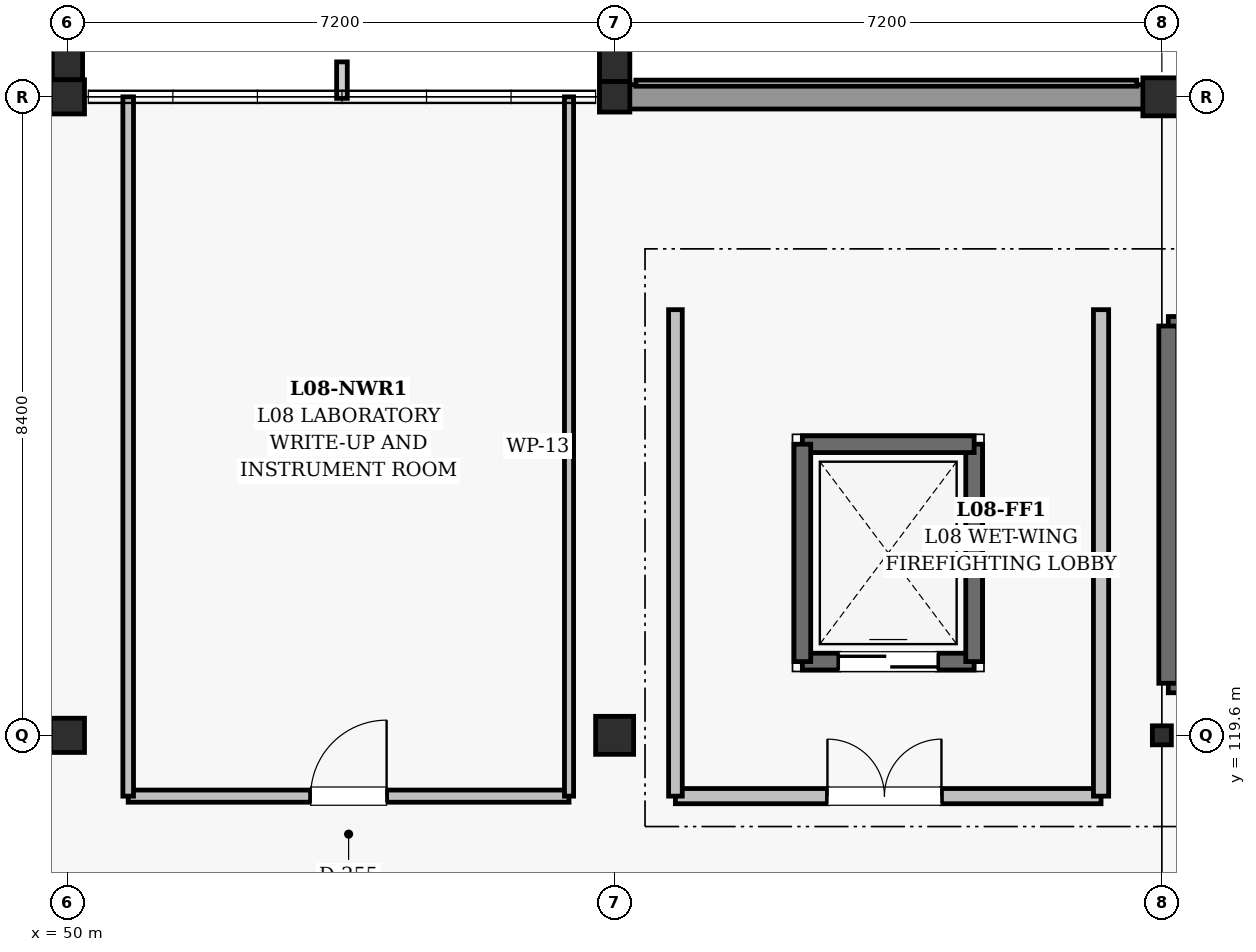
"""IFC4 building model, lengths in metres.
Left out: names, types, materials, properties, quantities, classifications, styles, units other than length and angle.
Written with IfcOpenShell. Run it as: python <this file> out.ifc"""

import sys

from ifc_helpers import new_model, si_unit, direction, frame, frame_2d, origin, origin_2d, place, context, subcontext, project, spatial, rectangle, i_section, extrude, element, fill, save


model = new_model("IFC4")
c1 = context("Model", 3, precision=1e-05, world=origin(), true_north=direction((0.0, 1.0)))
c2 = subcontext(c1, "Body", "Model", "MODEL_VIEW")
j1 = project(units=[si_unit("LENGTHUNIT", "METRE"), si_unit("PLANEANGLEUNIT", "RADIAN")], contexts=[c1])
p1 = place(None, origin())
s1 = spatial("IfcSite", under=j1, at=p1, CompositionType="ELEMENT")
p2 = place(p1, origin())
s2 = spatial("IfcBuilding", under=s1, at=p2, CompositionType="ELEMENT")
p3 = place(p2, frame((0.0, 0.0, 36.9)))
s3 = spatial("IfcBuildingStorey", under=s2, at=p3, CompositionType="ELEMENT", Elevation=36.9)
for number, where, z_axis, x_axis in (
    (1, (50.0, 119.6, 0.0), (0.0, 0.0, 1.0), (1.0, 0.0, 0.0)),
    (2, (50.0, 128.0, 0.0), (0.0, 0.0, 1.0), (1.0, 0.0, 0.0)),
):
    element("IfcColumn", number, at=place(p3, frame(where, z_axis=z_axis, x_axis=x_axis)), inside=s3, PredefinedType="COLUMN", context=c2, shape_type="SweptSolid", body=[
        extrude(rectangle(XDim=0.45, YDim=0.45, at=origin_2d()), origin(), (0.0, 0.0, 1.0), 4.5),
    ])
p4 = place(p3, frame((57.2, 119.6, 0.0), z_axis=(0.0, 0.0, 1.0), x_axis=(1.0, 0.0, 0.0)))
e3 = element("IfcColumn", 3, at=p4, inside=s3, PredefinedType="COLUMN", context=c2, shape_type="SweptSolid", body=[
    extrude(rectangle(XDim=0.5, YDim=0.5, at=origin_2d()), origin(), (0.0, 0.0, 1.0), 4.5),
])
p5 = place(p3, frame((57.2, 128.0, 0.0), z_axis=(0.0, 0.0, 1.0), x_axis=(1.0, 0.0, 0.0)))
e4 = element("IfcColumn", 4, at=p5, inside=s3, PredefinedType="COLUMN", context=c2, shape_type="SweptSolid", body=[
    extrude(rectangle(XDim=0.4, YDim=0.4, at=origin_2d()), origin(), (0.0, 0.0, 1.0), 4.5),
])
p6 = place(p3, frame((64.4, 119.6, 0.0), z_axis=(0.0, 0.0, 1.0), x_axis=(1.0, 0.0, 0.0)))
e5 = element("IfcColumn", 5, at=p6, inside=s3, PredefinedType="COLUMN", context=c2, shape_type="SweptSolid", body=[
    extrude(i_section(OverallWidth=0.25, OverallDepth=0.25, WebThickness=0.009, FlangeThickness=0.01, FilletRadius=0.01, at=origin_2d()), origin(), (0.0, 0.0, 1.0), 4.5),
])
p7 = place(p3, frame((64.4, 128.0, 0.0), z_axis=(0.0, 0.0, 1.0), x_axis=(1.0, 0.0, 0.0)))
e6 = element("IfcColumn", 6, at=p7, inside=s3, PredefinedType="COLUMN", context=c2, shape_type="SweptSolid", body=[
    extrude(rectangle(XDim=0.5, YDim=0.5, at=origin_2d()), origin(), (0.0, 0.0, 1.0), 4.5),
])
for number, where, z_axis, x_axis in (
    (7, (50.0, 128.528, 0.0), (0.0, 0.0, 1.0), (1.0, 0.0, 0.0)),
    (8, (57.2, 128.503, 0.0), (0.0, 0.0, 1.0), (1.0, 0.0, 0.0)),
):
    element("IfcColumn", number, at=place(p3, frame(where, z_axis=z_axis, x_axis=x_axis)), inside=s3, PredefinedType="PILASTER", context=c2, shape_type="SweptSolid", body=[
        extrude(rectangle(XDim=0.4, YDim=0.6, at=origin_2d()), origin(), (0.0, 0.0, 1.0), 4.5),
    ])
p8 = place(p3, frame((57.38, 128.0, 0.0), z_axis=(0.0, 0.0, 1.0), x_axis=(1.0, 0.0, 0.0)))
e9 = element("IfcWall", 9, at=p8, inside=s3, PredefinedType="SOLIDWALL", context=c2, shape_type="SweptSolid", body=[
    extrude(rectangle(XDim=6.79, YDim=0.32, at=frame_2d((3.395, 0.0))), origin(), (0.0, 0.0, 1.0), 3.305),
])
p9 = place(p3, frame((64.485, 120.285, 0.0), z_axis=(0.0, 0.0, 1.0), x_axis=(1.0, 0.0, 0.0)))
e10 = element("IfcWall", 10, at=p9, inside=s3, PredefinedType="SHEAR", context=c2, shape_type="SweptSolid", body=[
    extrude(rectangle(XDim=10.63, YDim=0.25, at=frame_2d((5.315, 0.0))), origin(), (0.0, 0.0, 1.0), 4.215),
])
p10 = place(p9, frame((0.55, 0.0, 0.0)))
e11 = element("IfcOpeningElement", 11, at=p10, cuts=e10, PredefinedType="OPENING", context=c2, shape_type="SweptSolid", body=[
    extrude(rectangle(XDim=1.2, YDim=2.15, at=frame_2d((0.6, 1.075))), frame((0.0, 0.135, 0.0), z_axis=(0.0, -1.0, 0.0), x_axis=(1.0, 0.0, 0.0)), (0.0, 0.0, 1.0), 0.27),
])
p11 = place(p3, frame((75.115, 124.985, 0.0), z_axis=(0.0, 0.0, 1.0), x_axis=(-1.0, 0.0, 0.0)))
e12 = element("IfcWall", 12, at=p11, inside=s3, PredefinedType="SHEAR", context=c2, shape_type="SweptSolid", body=[
    extrude(rectangle(XDim=10.63, YDim=0.25, at=frame_2d((5.315, 0.0))), origin(), (0.0, 0.0, 1.0), 4.215),
])
p12 = place(p3, frame((64.485, 124.985, 0.0), z_axis=(0.0, 0.0, 1.0), x_axis=(0.0, -1.0, 0.0)))
e13 = element("IfcWall", 13, at=p12, inside=s3, PredefinedType="SHEAR", context=c2, shape_type="SweptSolid", body=[
    extrude(rectangle(XDim=4.7, YDim=0.25, at=frame_2d((2.35, 0.0))), origin(), (0.0, 0.0, 1.0), 4.215),
])
p13 = place(p3, frame((59.67, 120.57, 0.0), z_axis=(0.0, 0.0, 1.0), x_axis=(1.0, 0.0, 0.0)))
e14 = element("IfcWall", 14, at=p13, inside=s3, PredefinedType="SHEAR", context=c2, shape_type="SweptSolid", body=[
    extrude(rectangle(XDim=2.26, YDim=0.22, at=frame_2d((1.13, 0.0))), origin(), (0.0, 0.0, 1.0), 4.215),
])
p14 = place(p13, frame((0.48, 0.0, 0.0)))
e15 = element("IfcOpeningElement", 15, at=p14, cuts=e14, PredefinedType="OPENING", context=c2, shape_type="SweptSolid", body=[
    extrude(rectangle(XDim=1.3, YDim=2.2, at=frame_2d((0.65, 1.1))), frame((0.0, 0.12, 0.0), z_axis=(0.0, -1.0, 0.0), x_axis=(1.0, 0.0, 0.0)), (0.0, 0.0, 1.0), 0.24),
])
p15 = place(p3, frame((61.93, 120.57, 0.0), z_axis=(0.0, 0.0, 1.0), x_axis=(0.0, 1.0, 0.0)))
e16 = element("IfcWall", 16, at=p15, inside=s3, PredefinedType="SHEAR", context=c2, shape_type="SweptSolid", body=[
    extrude(rectangle(XDim=2.86, YDim=0.22, at=frame_2d((1.43, 0.0))), origin(), (0.0, 0.0, 1.0), 4.215),
])
p16 = place(p3, frame((61.93, 123.43, 0.0), z_axis=(0.0, 0.0, 1.0), x_axis=(-1.0, 0.0, 0.0)))
e17 = element("IfcWall", 17, at=p16, inside=s3, PredefinedType="SHEAR", context=c2, shape_type="SweptSolid", body=[
    extrude(rectangle(XDim=2.26, YDim=0.22, at=frame_2d((1.13, 0.0))), origin(), (0.0, 0.0, 1.0), 4.215),
])
p17 = place(p3, frame((59.67, 123.43, 0.0), z_axis=(0.0, 0.0, 1.0), x_axis=(0.0, -1.0, 0.0)))
e18 = element("IfcWall", 18, at=p17, inside=s3, PredefinedType="SHEAR", context=c2, shape_type="SweptSolid", body=[
    extrude(rectangle(XDim=2.86, YDim=0.22, at=frame_2d((1.43, 0.0))), origin(), (0.0, 0.0, 1.0), 4.215),
])
p18 = place(p3, frame((58.0, 118.8, 0.0), z_axis=(0.0, 0.0, 1.0), x_axis=(1.0, 0.0, 0.0)))
e19 = element("IfcWall", 19, at=p18, inside=s3, PredefinedType="SOLIDWALL", context=c2, shape_type="SweptSolid", body=[
    extrude(rectangle(XDim=5.6, YDim=0.2, at=frame_2d((2.8, 0.0))), origin(), (0.0, 0.0, 1.0), 4.12),
])
p19 = place(p18, frame((2.0, 0.0, 0.0)))
e20 = element("IfcOpeningElement", 20, at=p19, cuts=e19, PredefinedType="OPENING", context=c2, shape_type="SweptSolid", body=[
    extrude(rectangle(XDim=1.5, YDim=2.2, at=frame_2d((0.75, 1.1))), frame((0.0, 0.11, 0.0), z_axis=(0.0, -1.0, 0.0), x_axis=(1.0, 0.0, 0.0)), (0.0, 0.0, 1.0), 0.22),
])
p20 = place(p3, frame((58.0, 118.8, 0.0), z_axis=(0.0, 0.0, 1.0), x_axis=(0.0, 1.0, 0.0)))
e21 = element("IfcWall", 21, at=p20, inside=s3, PredefinedType="SOLIDWALL", context=c2, shape_type="SweptSolid", body=[
    extrude(rectangle(XDim=6.4, YDim=0.18, at=frame_2d((3.2, 0.0))), origin(), (0.0, 0.0, 1.0), 3.36),
])
p21 = place(p3, frame((63.6, 118.8, 0.0), z_axis=(0.0, 0.0, 1.0), x_axis=(0.0, 1.0, 0.0)))
e22 = element("IfcWall", 22, at=p21, inside=s3, PredefinedType="SOLIDWALL", context=c2, shape_type="SweptSolid", body=[
    extrude(rectangle(XDim=6.4, YDim=0.2, at=frame_2d((3.2, 0.0))), origin(), (0.0, 0.0, 1.0), 3.36),
])
p22 = place(p3, frame((50.8, 118.8, 0.0), z_axis=(0.0, 0.0, 1.0), x_axis=(1.0, 0.0, 0.0)))
e23 = element("IfcWall", 23, at=p22, inside=s3, PredefinedType="PARTITIONING", context=c2, shape_type="SweptSolid", body=[
    extrude(rectangle(XDim=5.8, YDim=0.16, at=frame_2d((2.9, 0.0))), origin(), (0.0, 0.0, 1.0), 4.12),
])
p23 = place(p22, frame((2.4, 0.0, 0.0)))
e24 = element("IfcOpeningElement", 24, at=p23, cuts=e23, PredefinedType="OPENING", context=c2, shape_type="SweptSolid", body=[
    extrude(rectangle(XDim=1.0, YDim=2.15, at=frame_2d((0.5, 1.075))), frame((0.0, 0.09, 0.0), z_axis=(0.0, -1.0, 0.0), x_axis=(1.0, 0.0, 0.0)), (0.0, 0.0, 1.0), 0.18),
])
p24 = place(p3, frame((50.8, 118.8, 0.0), z_axis=(0.0, 0.0, 1.0), x_axis=(0.0, 1.0, 0.0)))
e25 = element("IfcWall", 25, at=p24, inside=s3, PredefinedType="PARTITIONING", context=c2, shape_type="SweptSolid", body=[
    extrude(rectangle(XDim=9.2, YDim=0.14, at=frame_2d((4.6, 0.0))), origin(), (0.0, 0.0, 1.0), 3.41),
])
p25 = place(p3, frame((56.6, 118.8, 0.0), z_axis=(0.0, 0.0, 1.0), x_axis=(0.0, 1.0, 0.0)))
e26 = element("IfcWall", 26, at=p25, inside=s3, PredefinedType="PARTITIONING", context=c2, shape_type="SweptSolid", body=[
    extrude(rectangle(XDim=9.2, YDim=0.12, at=frame_2d((4.6, 0.0))), origin(), (0.0, 0.0, 1.0), 3.41),
])
p26 = place(p14, origin())
e27 = element("IfcDoor", 27, at=p26, inside=s3, OperationType="DOUBLE_DOOR_SLIDING", PredefinedType="DOOR", context=c2, shape_type="SweptSolid", body=[
    extrude(rectangle(XDim=1.3, YDim=2.2, at=frame_2d((0.65, 1.1))), frame((0.0, 0.025, 0.0), z_axis=(0.0, -1.0, 0.0), x_axis=(1.0, 0.0, 0.0)), (0.0, 0.0, 1.0), 0.05),
])
fill(e15, e27)
p27 = place(p19, origin())
e28 = element("IfcDoor", 28, at=p27, inside=s3, OperationType="DOUBLE_DOOR_SINGLE_SWING", PredefinedType="DOOR", context=c2, shape_type="SweptSolid", body=[
    extrude(rectangle(XDim=1.5, YDim=2.2, at=frame_2d((0.75, 1.1))), frame((0.0, 0.025, 0.0), z_axis=(0.0, -1.0, 0.0), x_axis=(1.0, 0.0, 0.0)), (0.0, 0.0, 1.0), 0.05),
])
fill(e20, e28)
p28 = place(p23, origin())
e29 = element("IfcDoor", 29, at=p28, inside=s3, OperationType="SINGLE_SWING_RIGHT", PredefinedType="DOOR", context=c2, shape_type="SweptSolid", body=[
    extrude(rectangle(XDim=1.0, YDim=2.15, at=frame_2d((0.5, 1.075))), frame((0.0, 0.025, 0.0), z_axis=(0.0, -1.0, 0.0), x_axis=(1.0, 0.0, 0.0)), (0.0, 0.0, 1.0), 0.05),
])
fill(e24, e29)
save(model, sys.argv[1])
